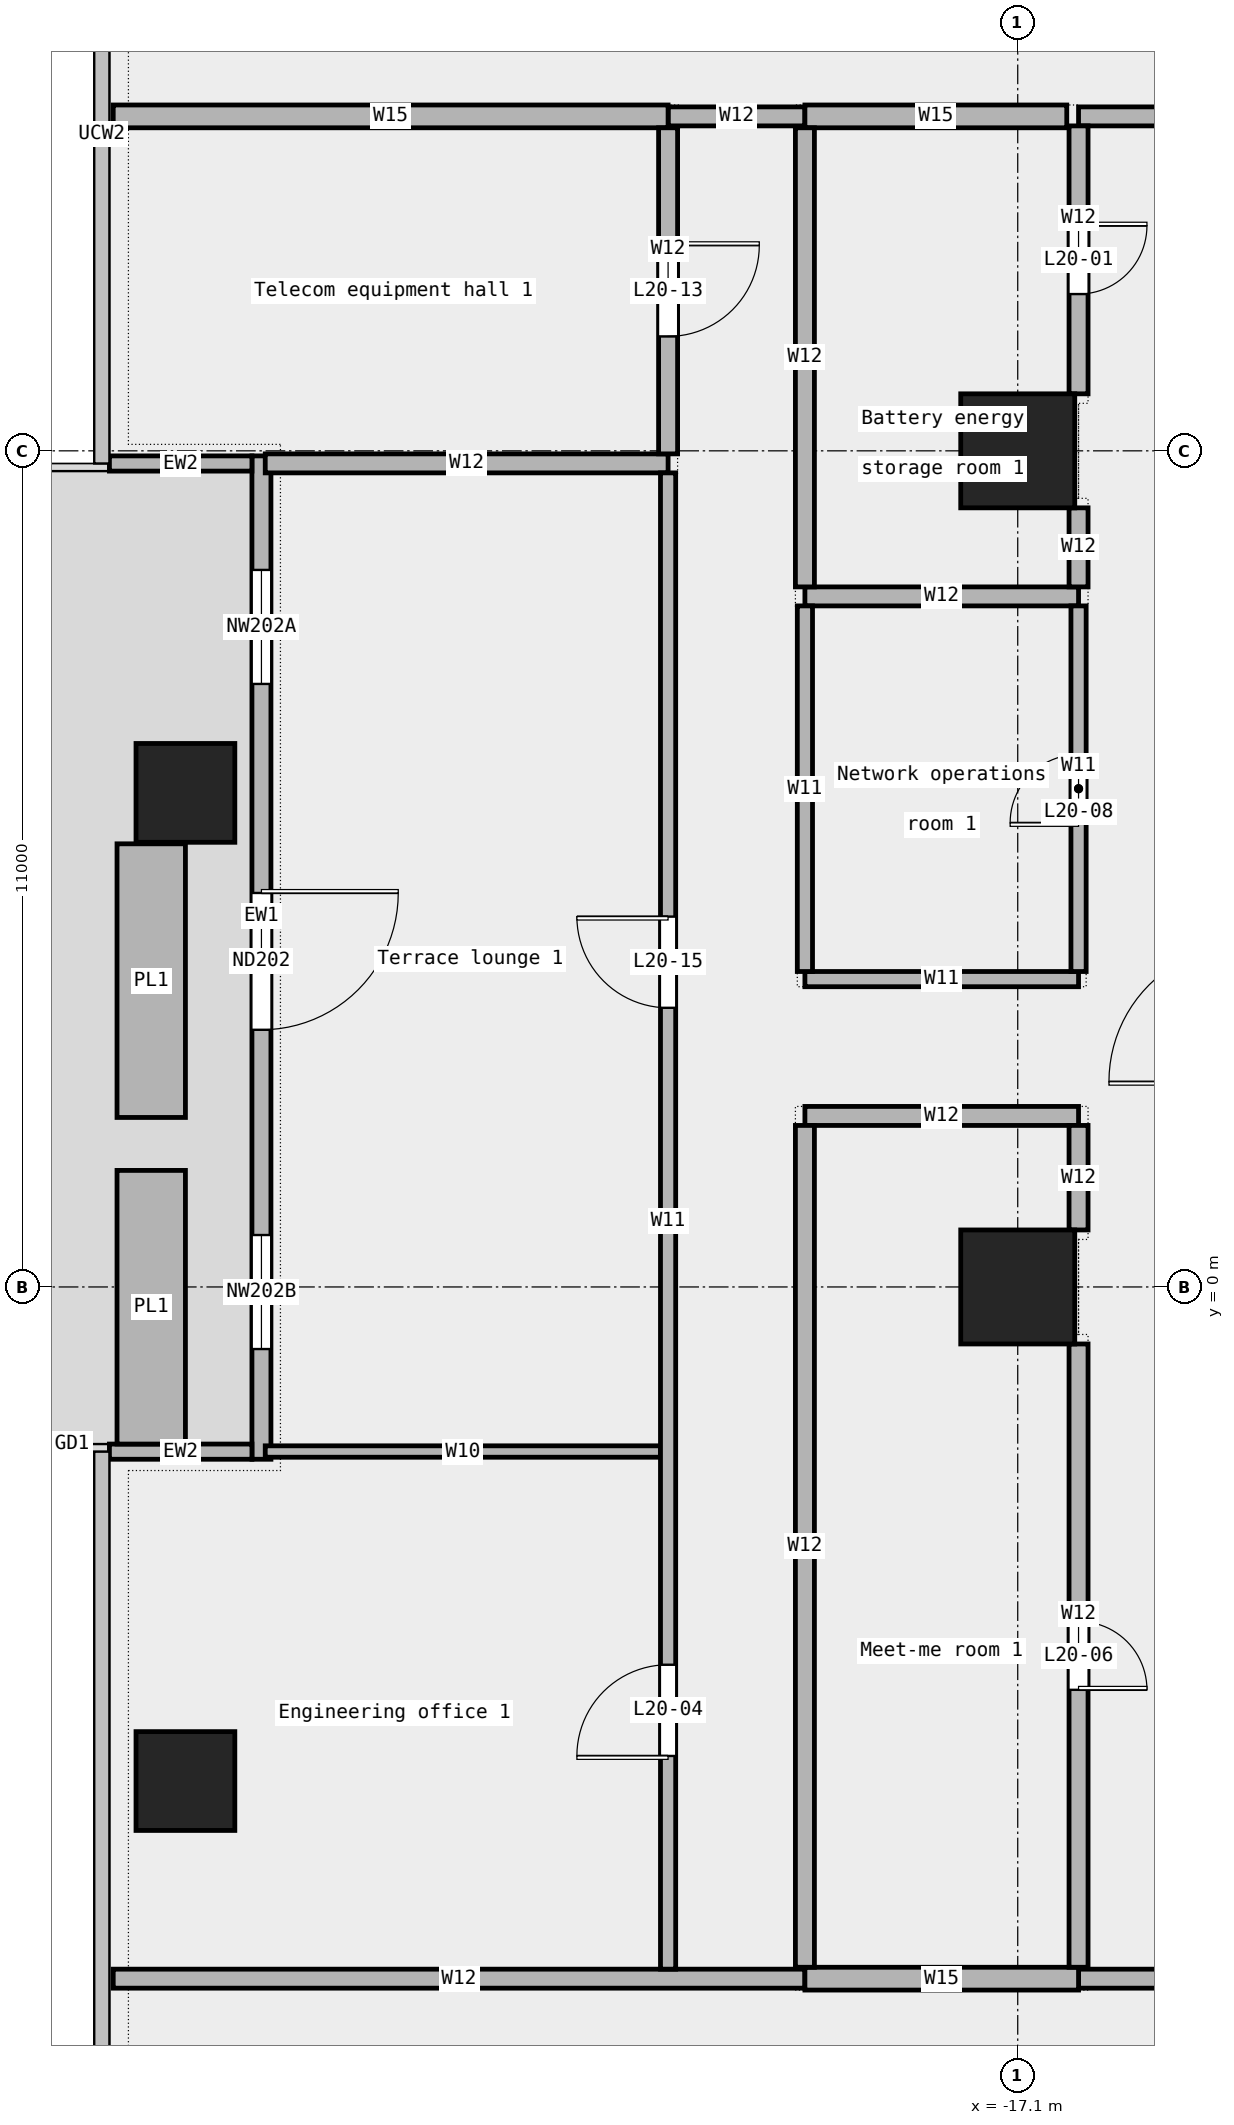
"""IFC4 building model, lengths in metres.
Left out: names, types, materials, properties, quantities, classifications, styles, units other than length and angle.
Written with IfcOpenShell. Run it as: python <this file> out.ifc"""

import sys

from ifc_helpers import new_model, si_unit, direction, frame, frame_2d, origin, origin_2d, place, context, subcontext, project, spatial, rectangle, extrude, element, fill, save


model = new_model("IFC4")
c1 = context("Model", 3, precision=1e-05, world=origin(), true_north=direction((0.0, 1.0)))
c2 = subcontext(c1, "Body", "Model", "MODEL_VIEW")
j1 = project(units=[si_unit("LENGTHUNIT", "METRE"), si_unit("PLANEANGLEUNIT", "RADIAN")], contexts=[c1])
p1 = place(None, origin())
s1 = spatial("IfcSite", under=j1, at=p1, CompositionType="ELEMENT")
p2 = place(p1, origin())
s2 = spatial("IfcBuilding", under=s1, at=p2, CompositionType="ELEMENT")
p3 = place(p2, frame((0.0, 0.0, 103.6)))
s3 = spatial("IfcBuildingStorey", under=s2, at=p3, CompositionType="ELEMENT", Elevation=103.6)
for number, where, z_axis, x_axis in (
    (1, (-28.05, 6.5, 0.0), (0.0, 0.0, 1.0), (1.0, 0.0, 0.0)),
    (2, (-28.05, -6.5, 0.0), (0.0, 0.0, 1.0), (1.0, 0.0, 0.0)),
):
    element("IfcColumn", number, at=place(p3, frame(where, z_axis=z_axis, x_axis=x_axis)), inside=s3, PredefinedType="COLUMN", context=c2, shape_type="SweptSolid", body=[
        extrude(rectangle(XDim=1.3, YDim=1.3, at=origin_2d()), origin(), (0.0, 0.0, 1.0), 4.05),
    ])
for number, where, z_axis, x_axis in (
    (3, (-17.1, 0.0, 0.0), (0.0, 0.0, 1.0), (1.0, 0.0, 0.0)),
    (4, (-17.1, 11.0, 0.0), (0.0, 0.0, 1.0), (1.0, 0.0, 0.0)),
):
    element("IfcColumn", number, at=place(p3, frame(where, z_axis=z_axis, x_axis=x_axis)), inside=s3, PredefinedType="COLUMN", context=c2, shape_type="SweptSolid", body=[
        extrude(rectangle(XDim=1.5, YDim=1.5, at=origin_2d()), origin(), (0.0, 0.0, 1.0), 4.05),
    ])
p4 = place(p3, frame((-27.05, 10.933, 0.0), z_axis=(0.0, 0.0, 1.0), x_axis=(0.0, -1.0, 0.0)))
e5 = element("IfcWall", 5, at=p4, inside=s3, PredefinedType="STANDARD", context=c2, shape_type="SweptSolid", body=[
    extrude(rectangle(XDim=13.2, YDim=0.25, at=frame_2d((6.6, 0.0))), origin(), (0.0, 0.0, 1.0), 4.05),
])
p5 = place(p4, frame((1.5, 0.0, 0.45)))
e6 = element("IfcOpeningElement", 6, at=p5, cuts=e5, PredefinedType="OPENING", context=c2, shape_type="SweptSolid", body=[
    extrude(rectangle(XDim=1.5, YDim=3.0, at=frame_2d((0.75, 1.5))), frame((0.0, 0.137, 0.0), z_axis=(0.0, -1.0, 0.0), x_axis=(1.0, 0.0, 0.0)), (0.0, 0.0, 1.0), 0.274),
])
p6 = place(p4, frame((5.75, 0.0, 0.0)))
e7 = element("IfcOpeningElement", 7, at=p6, cuts=e5, PredefinedType="OPENING", context=c2, shape_type="SweptSolid", body=[
    extrude(rectangle(XDim=1.8, YDim=2.4, at=frame_2d((0.9, 1.2))), frame((0.0, 0.137, 0.0), z_axis=(0.0, -1.0, 0.0), x_axis=(1.0, 0.0, 0.0)), (0.0, 0.0, 1.0), 0.274),
])
p7 = place(p4, frame((10.25, 0.0, 0.45)))
e8 = element("IfcOpeningElement", 8, at=p7, cuts=e5, PredefinedType="OPENING", context=c2, shape_type="SweptSolid", body=[
    extrude(rectangle(XDim=1.5, YDim=3.0, at=frame_2d((0.75, 1.5))), frame((0.0, 0.137, 0.0), z_axis=(0.0, -1.0, 0.0), x_axis=(1.0, 0.0, 0.0)), (0.0, 0.0, 1.0), 0.274),
])
for number, where, z_axis, x_axis in (
    (9, (-29.05, 10.833, 0.0), (0.0, 0.0, 1.0), (1.0, 0.0, 0.0)),
    (10, (-29.05, -2.167, 0.0), (0.0, 0.0, 1.0), (1.0, 0.0, 0.0)),
):
    element("IfcWall", number, at=place(p3, frame(where, z_axis=z_axis, x_axis=x_axis)), inside=s3, PredefinedType="STANDARD", context=c2, shape_type="SweptSolid", body=[
        extrude(rectangle(XDim=1.875, YDim=0.2, at=frame_2d((0.938, 0.0))), origin(), (0.0, 0.0, 1.0), 4.05),
    ])
for number, where, z_axis, x_axis in (
    (11, (-28.5, 5.83, 0.0), (0.0, 0.0, 1.0), (0.0, -1.0, 0.0)),
    (12, (-28.5, 1.533, 0.0), (0.0, 0.0, 1.0), (0.0, -1.0, 0.0)),
):
    element("IfcWall", number, at=place(p3, frame(where, z_axis=z_axis, x_axis=x_axis)), inside=s3, PredefinedType="STANDARD", context=c2, shape_type="SweptSolid", body=[
        extrude(rectangle(XDim=3.6, YDim=0.9, at=frame_2d((1.8, 0.0))), origin(), (0.0, 0.0, 1.0), 0.7),
    ])
p8 = place(p3, frame((-29.0, -9.1, 0.0), z_axis=(0.0, 0.0, 1.0), x_axis=(1.0, 0.0, 0.0)))
e13 = element("IfcWall", 13, at=p8, inside=s3, PredefinedType="PARTITIONING", context=c2, shape_type="SweptSolid", body=[
    extrude(rectangle(XDim=9.1, YDim=0.25, at=frame_2d((4.55, 0.0))), origin(), (0.0, 0.0, 1.0), 4.05),
])
p9 = place(p3, frame((-16.3, -9.1, 0.0), z_axis=(0.0, 0.0, 1.0), x_axis=(1.0, 0.0, 0.0)))
e14 = element("IfcWall", 14, at=p9, inside=s3, PredefinedType="PARTITIONING", context=c2, shape_type="SweptSolid", body=[
    extrude(rectangle(XDim=2.73, YDim=0.25, at=frame_2d((1.365, 0.0))), origin(), (0.0, 0.0, 1.0), 4.05),
])
p10 = place(p3, frame((-19.9, -9.1, 0.0), z_axis=(0.0, 0.0, 1.0), x_axis=(1.0, 0.0, 0.0)))
e15 = element("IfcWall", 15, at=p10, inside=s3, PredefinedType="PARTITIONING", context=c2, shape_type="SweptSolid", body=[
    extrude(rectangle(XDim=3.6, YDim=0.3, at=frame_2d((1.8, 0.0))), origin(), (0.0, 0.0, 1.0), 4.05),
])
p11 = place(p3, frame((-27.0, -2.165, 0.0), z_axis=(0.0, 0.0, 1.0), x_axis=(1.0, 0.0, 0.0)))
e16 = element("IfcWall", 16, at=p11, inside=s3, PredefinedType="PARTITIONING", context=c2, shape_type="SweptSolid", body=[
    extrude(rectangle(XDim=5.2, YDim=0.15, at=frame_2d((2.6, 0.0))), origin(), (0.0, 0.0, 1.0), 4.05),
])
p12 = place(p3, frame((-19.9, 2.25, 0.0), z_axis=(0.0, 0.0, 1.0), x_axis=(1.0, 0.0, 0.0)))
e17 = element("IfcWall", 17, at=p12, inside=s3, PredefinedType="PARTITIONING", context=c2, shape_type="SweptSolid", body=[
    extrude(rectangle(XDim=3.6, YDim=0.25, at=frame_2d((1.8, 0.0))), origin(), (0.0, 0.0, 1.0), 4.05),
])
p13 = place(p3, frame((-19.9, 4.05, 0.0), z_axis=(0.0, 0.0, 1.0), x_axis=(1.0, 0.0, 0.0)))
e18 = element("IfcWall", 18, at=p13, inside=s3, PredefinedType="PARTITIONING", context=c2, shape_type="SweptSolid", body=[
    extrude(rectangle(XDim=3.6, YDim=0.2, at=frame_2d((1.8, 0.0))), origin(), (0.0, 0.0, 1.0), 4.05),
])
p14 = place(p3, frame((-19.9, 9.085, 0.0), z_axis=(0.0, 0.0, 1.0), x_axis=(1.0, 0.0, 0.0)))
e19 = element("IfcWall", 19, at=p14, inside=s3, PredefinedType="PARTITIONING", context=c2, shape_type="SweptSolid", body=[
    extrude(rectangle(XDim=3.6, YDim=0.25, at=frame_2d((1.8, 0.0))), origin(), (0.0, 0.0, 1.0), 4.05),
])
p15 = place(p3, frame((-27.0, 10.835, 0.0), z_axis=(0.0, 0.0, 1.0), x_axis=(1.0, 0.0, 0.0)))
e20 = element("IfcWall", 20, at=p15, inside=s3, PredefinedType="PARTITIONING", context=c2, shape_type="SweptSolid", body=[
    extrude(rectangle(XDim=5.3, YDim=0.25, at=frame_2d((2.65, 0.0))), origin(), (0.0, 0.0, 1.0), 4.05),
])
p16 = place(p3, frame((-21.7, 15.4, 0.0), z_axis=(0.0, 0.0, 1.0), x_axis=(1.0, 0.0, 0.0)))
e21 = element("IfcWall", 21, at=p16, inside=s3, PredefinedType="PARTITIONING", context=c2, shape_type="SweptSolid", body=[
    extrude(rectangle(XDim=1.8, YDim=0.25, at=frame_2d((0.9, 0.0))), origin(), (0.0, 0.0, 1.0), 4.05),
])
p17 = place(p3, frame((-16.3, 15.4, 0.0), z_axis=(0.0, 0.0, 1.0), x_axis=(1.0, 0.0, 0.0)))
e22 = element("IfcWall", 22, at=p17, inside=s3, PredefinedType="PARTITIONING", context=c2, shape_type="SweptSolid", body=[
    extrude(rectangle(XDim=17.3, YDim=0.25, at=frame_2d((8.65, 0.0))), origin(), (0.0, 0.0, 1.0), 4.05),
])
p18 = place(p17, frame((12.085, 0.0, 0.0)))
e23 = element("IfcOpeningElement", 23, at=p18, cuts=e22, PredefinedType="OPENING", context=c2, shape_type="SweptSolid", body=[
    extrude(rectangle(XDim=1.2, YDim=2.1, at=frame_2d((0.6, 1.05))), frame((0.0, 0.137, 0.0), z_axis=(0.0, -1.0, 0.0), x_axis=(1.0, 0.0, 0.0)), (0.0, 0.0, 1.0), 0.274),
])
p19 = place(p17, frame((3.135, 0.0, 0.0)))
e24 = element("IfcOpeningElement", 24, at=p19, cuts=e22, PredefinedType="OPENING", context=c2, shape_type="SweptSolid", body=[
    extrude(rectangle(XDim=1.8, YDim=2.1, at=frame_2d((0.9, 1.05))), frame((0.0, 0.137, 0.0), z_axis=(0.0, -1.0, 0.0), x_axis=(1.0, 0.0, 0.0)), (0.0, 0.0, 1.0), 0.274),
])
p20 = place(p3, frame((-29.0, 15.4, 0.0), z_axis=(0.0, 0.0, 1.0), x_axis=(1.0, 0.0, 0.0)))
e25 = element("IfcWall", 25, at=p20, inside=s3, PredefinedType="PARTITIONING", context=c2, shape_type="SweptSolid", body=[
    extrude(rectangle(XDim=7.3, YDim=0.3, at=frame_2d((3.65, 0.0))), origin(), (0.0, 0.0, 1.0), 4.05),
])
p21 = place(p3, frame((-19.9, 15.4, 0.0), z_axis=(0.0, 0.0, 1.0), x_axis=(1.0, 0.0, 0.0)))
e26 = element("IfcWall", 26, at=p21, inside=s3, PredefinedType="PARTITIONING", context=c2, shape_type="SweptSolid", body=[
    extrude(rectangle(XDim=3.445, YDim=0.3, at=frame_2d((1.722, 0.0))), origin(), (0.0, 0.0, 1.0), 4.05),
])
p22 = place(p3, frame((-21.7, -8.975, 0.0), z_axis=(0.0, 0.0, 1.0), x_axis=(0.0, 1.0, 0.0)))
e27 = element("IfcWall", 27, at=p22, inside=s3, PredefinedType="PARTITIONING", context=c2, shape_type="SweptSolid", body=[
    extrude(rectangle(XDim=19.685, YDim=0.2, at=frame_2d((9.843, 0.0))), origin(), (0.0, 0.0, 1.0), 4.05),
])
p23 = place(p22, frame((2.805, 0.0, 0.0)))
e28 = element("IfcOpeningElement", 28, at=p23, cuts=e27, PredefinedType="OPENING", context=c2, shape_type="SweptSolid", body=[
    extrude(rectangle(XDim=1.2, YDim=2.1, at=frame_2d((0.6, 1.05))), frame((0.0, 0.112, 0.0), z_axis=(0.0, -1.0, 0.0), x_axis=(1.0, 0.0, 0.0)), (0.0, 0.0, 1.0), 0.224),
])
p24 = place(p22, frame((12.647, 0.0, 0.0)))
e29 = element("IfcOpeningElement", 29, at=p24, cuts=e27, PredefinedType="OPENING", context=c2, shape_type="SweptSolid", body=[
    extrude(rectangle(XDim=1.2, YDim=2.1, at=frame_2d((0.6, 1.05))), frame((0.0, 0.112, 0.0), z_axis=(0.0, -1.0, 0.0), x_axis=(1.0, 0.0, 0.0)), (0.0, 0.0, 1.0), 0.224),
])
p25 = place(p3, frame((-21.7, 10.96, 0.0), z_axis=(0.0, 0.0, 1.0), x_axis=(0.0, 1.0, 0.0)))
e30 = element("IfcWall", 30, at=p25, inside=s3, PredefinedType="PARTITIONING", context=c2, shape_type="SweptSolid", body=[
    extrude(rectangle(XDim=4.29, YDim=0.25, at=frame_2d((2.145, 0.0))), origin(), (0.0, 0.0, 1.0), 4.05),
])
p26 = place(p25, frame((1.545, 0.0, 0.0)))
e31 = element("IfcOpeningElement", 31, at=p26, cuts=e30, PredefinedType="OPENING", context=c2, shape_type="SweptSolid", body=[
    extrude(rectangle(XDim=1.2, YDim=2.1, at=frame_2d((0.6, 1.05))), frame((0.0, 0.137, 0.0), z_axis=(0.0, -1.0, 0.0), x_axis=(1.0, 0.0, 0.0)), (0.0, 0.0, 1.0), 0.274),
])
p27 = place(p3, frame((-19.9, 4.15, 0.0), z_axis=(0.0, 0.0, 1.0), x_axis=(0.0, 1.0, 0.0)))
e32 = element("IfcWall", 32, at=p27, inside=s3, PredefinedType="PARTITIONING", context=c2, shape_type="SweptSolid", body=[
    extrude(rectangle(XDim=4.81, YDim=0.2, at=frame_2d((2.405, 0.0))), origin(), (0.0, 0.0, 1.0), 4.05),
])
p28 = place(p3, frame((-19.9, -8.95, 0.0), z_axis=(0.0, 0.0, 1.0), x_axis=(0.0, 1.0, 0.0)))
e33 = element("IfcWall", 33, at=p28, inside=s3, PredefinedType="PARTITIONING", context=c2, shape_type="SweptSolid", body=[
    extrude(rectangle(XDim=11.075, YDim=0.25, at=frame_2d((5.538, 0.0))), origin(), (0.0, 0.0, 1.0), 4.05),
])
p29 = place(p3, frame((-19.9, 9.21, 0.0), z_axis=(0.0, 0.0, 1.0), x_axis=(0.0, 1.0, 0.0)))
e34 = element("IfcWall", 34, at=p29, inside=s3, PredefinedType="PARTITIONING", context=c2, shape_type="SweptSolid", body=[
    extrude(rectangle(XDim=6.04, YDim=0.25, at=frame_2d((3.02, 0.0))), origin(), (0.0, 0.0, 1.0), 4.05),
])
p30 = place(p3, frame((-16.3, 4.15, 0.0), z_axis=(0.0, 0.0, 1.0), x_axis=(0.0, 1.0, 0.0)))
e35 = element("IfcWall", 35, at=p30, inside=s3, PredefinedType="PARTITIONING", context=c2, shape_type="SweptSolid", body=[
    extrude(rectangle(XDim=4.81, YDim=0.2, at=frame_2d((2.405, 0.0))), origin(), (0.0, 0.0, 1.0), 4.05),
])
p31 = place(p30, frame((1.955, 0.0, 0.0)))
e36 = element("IfcOpeningElement", 36, at=p31, cuts=e35, PredefinedType="OPENING", context=c2, shape_type="SweptSolid", body=[
    extrude(rectangle(XDim=0.9, YDim=2.1, at=frame_2d((0.45, 1.05))), frame((0.0, 0.112, 0.0), z_axis=(0.0, -1.0, 0.0), x_axis=(1.0, 0.0, 0.0)), (0.0, 0.0, 1.0), 0.224),
])
p32 = place(p3, frame((-16.3, -8.95, 0.0), z_axis=(0.0, 0.0, 1.0), x_axis=(0.0, 1.0, 0.0)))
e37 = element("IfcWall", 37, at=p32, inside=s3, PredefinedType="PARTITIONING", context=c2, shape_type="SweptSolid", body=[
    extrude(rectangle(XDim=8.2, YDim=0.25, at=frame_2d((4.1, 0.0))), origin(), (0.0, 0.0, 1.0), 4.05),
])
p33 = place(p32, frame((3.65, 0.0, 0.0)))
e38 = element("IfcOpeningElement", 38, at=p33, cuts=e37, PredefinedType="OPENING", context=c2, shape_type="SweptSolid", body=[
    extrude(rectangle(XDim=0.9, YDim=2.1, at=frame_2d((0.45, 1.05))), frame((0.0, 0.137, 0.0), z_axis=(0.0, -1.0, 0.0), x_axis=(1.0, 0.0, 0.0)), (0.0, 0.0, 1.0), 0.274),
])
p34 = place(p3, frame((-16.3, 0.75, 0.0), z_axis=(0.0, 0.0, 1.0), x_axis=(0.0, 1.0, 0.0)))
e39 = element("IfcWall", 39, at=p34, inside=s3, PredefinedType="PARTITIONING", context=c2, shape_type="SweptSolid", body=[
    extrude(rectangle(XDim=1.375, YDim=0.25, at=frame_2d((0.688, 0.0))), origin(), (0.0, 0.0, 1.0), 4.05),
])
p35 = place(p3, frame((-16.3, 9.21, 0.0), z_axis=(0.0, 0.0, 1.0), x_axis=(0.0, 1.0, 0.0)))
e40 = element("IfcWall", 40, at=p35, inside=s3, PredefinedType="PARTITIONING", context=c2, shape_type="SweptSolid", body=[
    extrude(rectangle(XDim=1.04, YDim=0.25, at=frame_2d((0.52, 0.0))), origin(), (0.0, 0.0, 1.0), 4.05),
])
p36 = place(p3, frame((-16.3, 11.75, 0.0), z_axis=(0.0, 0.0, 1.0), x_axis=(0.0, 1.0, 0.0)))
e41 = element("IfcWall", 41, at=p36, inside=s3, PredefinedType="PARTITIONING", context=c2, shape_type="SweptSolid", body=[
    extrude(rectangle(XDim=3.525, YDim=0.25, at=frame_2d((1.762, 0.0))), origin(), (0.0, 0.0, 1.0), 4.05),
])
p37 = place(p36, frame((1.312, 0.0, 0.0)))
e42 = element("IfcOpeningElement", 42, at=p37, cuts=e41, PredefinedType="OPENING", context=c2, shape_type="SweptSolid", body=[
    extrude(rectangle(XDim=0.9, YDim=2.1, at=frame_2d((0.45, 1.05))), frame((0.0, 0.137, 0.0), z_axis=(0.0, -1.0, 0.0), x_axis=(1.0, 0.0, 0.0)), (0.0, 0.0, 1.0), 0.274),
])
p38 = place(p5, origin())
e43 = element("IfcWindow", 43, at=p38, inside=s3, PartitioningType="SINGLE_PANEL", PredefinedType="WINDOW", context=c2, shape_type="SweptSolid", body=[
    extrude(rectangle(XDim=1.5, YDim=3.0, at=frame_2d((0.75, 1.5))), frame((0.0, 0.03, 0.0), z_axis=(0.0, -1.0, 0.0), x_axis=(1.0, 0.0, 0.0)), (0.0, 0.0, 1.0), 0.06),
])
fill(e6, e43)
p39 = place(p6, origin())
e44 = element("IfcDoor", 44, at=p39, inside=s3, OperationType="DOUBLE_DOOR_SINGLE_SWING", PredefinedType="DOOR", context=c2, shape_type="SweptSolid", body=[
    extrude(rectangle(XDim=1.8, YDim=2.4, at=frame_2d((0.9, 1.2))), frame((0.0, 0.025, 0.0), z_axis=(0.0, -1.0, 0.0), x_axis=(1.0, 0.0, 0.0)), (0.0, 0.0, 1.0), 0.05),
])
fill(e7, e44)
p40 = place(p7, origin())
e45 = element("IfcWindow", 45, at=p40, inside=s3, PartitioningType="SINGLE_PANEL", PredefinedType="WINDOW", context=c2, shape_type="SweptSolid", body=[
    extrude(rectangle(XDim=1.5, YDim=3.0, at=frame_2d((0.75, 1.5))), frame((0.0, 0.03, 0.0), z_axis=(0.0, -1.0, 0.0), x_axis=(1.0, 0.0, 0.0)), (0.0, 0.0, 1.0), 0.06),
])
fill(e8, e45)
p41 = place(p37, origin())
e46 = element("IfcDoor", 46, at=p41, inside=s3, OperationType="SINGLE_SWING_LEFT", PredefinedType="DOOR", context=c2, shape_type="SweptSolid", body=[
    extrude(rectangle(XDim=0.9, YDim=2.1, at=frame_2d((0.45, 1.05))), frame((0.0, 0.025, 0.0), z_axis=(0.0, -1.0, 0.0), x_axis=(1.0, 0.0, 0.0)), (0.0, 0.0, 1.0), 0.05),
])
fill(e42, e46)
p42 = place(p23, origin())
e47 = element("IfcDoor", 47, at=p42, inside=s3, OperationType="SINGLE_SWING_LEFT", PredefinedType="DOOR", context=c2, shape_type="SweptSolid", body=[
    extrude(rectangle(XDim=1.2, YDim=2.1, at=frame_2d((0.6, 1.05))), frame((0.0, 0.025, 0.0), z_axis=(0.0, -1.0, 0.0), x_axis=(1.0, 0.0, 0.0)), (0.0, 0.0, 1.0), 0.05),
])
fill(e28, e47)
p43 = place(p33, origin())
e48 = element("IfcDoor", 48, at=p43, inside=s3, OperationType="SINGLE_SWING_RIGHT", PredefinedType="DOOR", context=c2, shape_type="SweptSolid", body=[
    extrude(rectangle(XDim=0.9, YDim=2.1, at=frame_2d((0.45, 1.05))), frame((0.0, 0.025, 0.0), z_axis=(0.0, -1.0, 0.0), x_axis=(1.0, 0.0, 0.0)), (0.0, 0.0, 1.0), 0.05),
])
fill(e38, e48)
p44 = place(p31, origin())
e49 = element("IfcDoor", 49, at=p44, inside=s3, OperationType="SINGLE_SWING_LEFT", PredefinedType="DOOR", context=c2, shape_type="SweptSolid", body=[
    extrude(rectangle(XDim=0.9, YDim=2.1, at=frame_2d((0.45, 1.05))), frame((0.0, 0.025, 0.0), z_axis=(0.0, -1.0, 0.0), x_axis=(1.0, 0.0, 0.0)), (0.0, 0.0, 1.0), 0.05),
])
fill(e36, e49)
p45 = place(p26, origin())
e50 = element("IfcDoor", 50, at=p45, inside=s3, OperationType="SINGLE_SWING_LEFT", PredefinedType="DOOR", context=c2, shape_type="SweptSolid", body=[
    extrude(rectangle(XDim=1.2, YDim=2.1, at=frame_2d((0.6, 1.05))), frame((0.0, 0.025, 0.0), z_axis=(0.0, -1.0, 0.0), x_axis=(1.0, 0.0, 0.0)), (0.0, 0.0, 1.0), 0.05),
])
fill(e31, e50)
p46 = place(p24, origin())
e51 = element("IfcDoor", 51, at=p46, inside=s3, OperationType="SINGLE_SWING_RIGHT", PredefinedType="DOOR", context=c2, shape_type="SweptSolid", body=[
    extrude(rectangle(XDim=1.2, YDim=2.1, at=frame_2d((0.6, 1.05))), frame((0.0, 0.025, 0.0), z_axis=(0.0, -1.0, 0.0), x_axis=(1.0, 0.0, 0.0)), (0.0, 0.0, 1.0), 0.05),
])
fill(e29, e51)
save(model, sys.argv[1])
